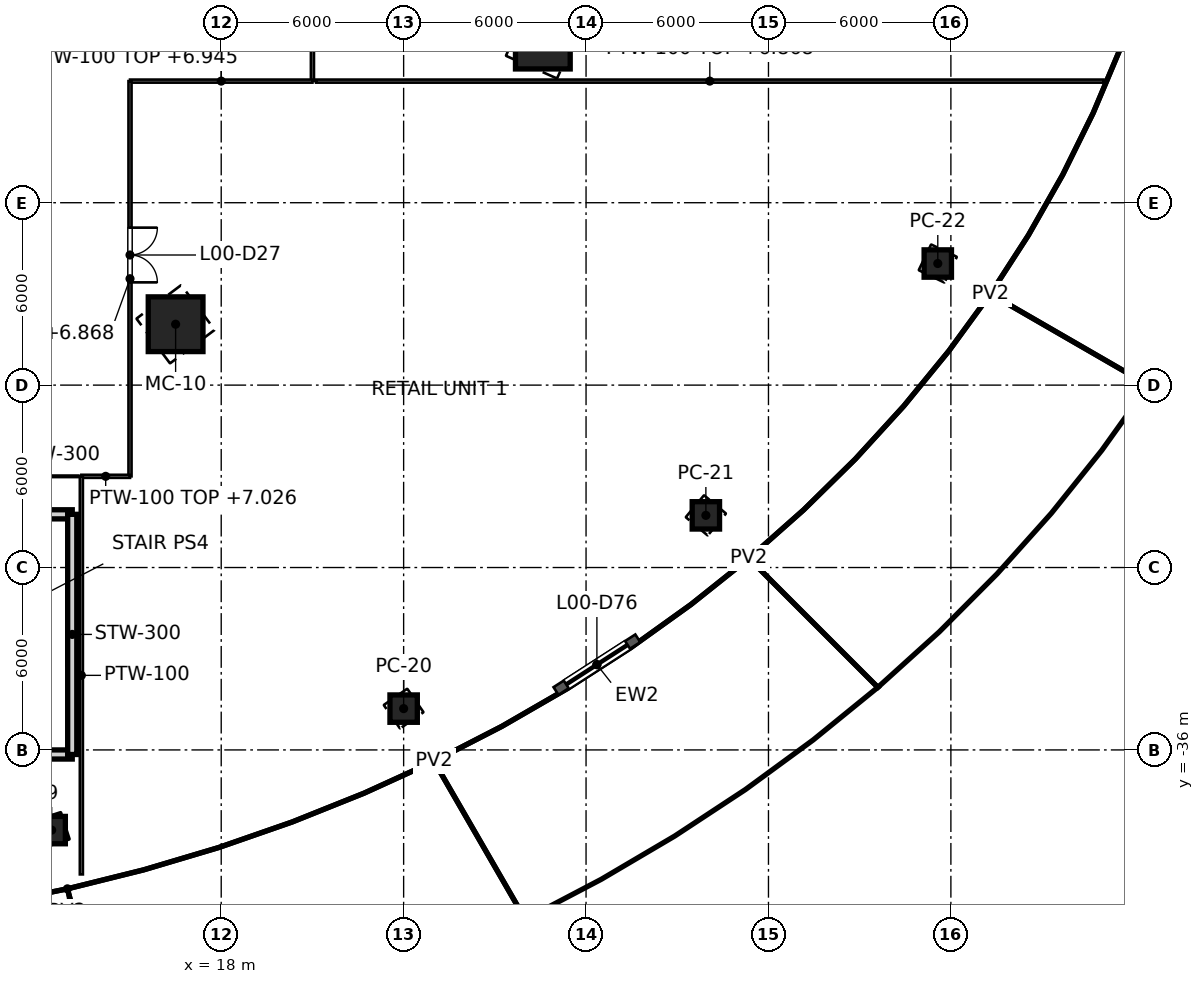
"""IFC4 building model, lengths in metres.
Left out: names, types, materials, properties, quantities, classifications, styles, units other than length and angle.
Written with IfcOpenShell. Run it as: python <this file> out.ifc"""

import sys

from ifc_helpers import new_model, si_unit, direction, frame, frame_2d, origin, origin_2d, place, context, subcontext, project, spatial, rectangle, hollow_rectangle, extrude, element, fill, save


model = new_model("IFC4")
c1 = context("Model", 3, precision=1e-05, world=origin(), true_north=direction((0.0, 1.0)))
c2 = subcontext(c1, "Body", "Model", "MODEL_VIEW")
j1 = project(units=[si_unit("LENGTHUNIT", "METRE"), si_unit("PLANEANGLEUNIT", "RADIAN")], contexts=[c1])
p1 = place(None, origin())
s1 = spatial("IfcSite", under=j1, at=p1, CompositionType="ELEMENT")
p2 = place(p1, origin())
s2 = spatial("IfcBuilding", under=s1, at=p2, CompositionType="ELEMENT")
p3 = place(p2, origin())
s3 = spatial("IfcBuildingStorey", under=s2, at=p3, CompositionType="ELEMENT", Elevation=0.0)
for number, where, z_axis, x_axis in (
    (1, (16.5, -21.997, 0.0), (0.0, 0.0, 1.0), (0.6, -0.8, 0.0)),
    (2, (28.579, -12.7, 0.0), (0.0, 0.0, 1.0), (0.914, -0.406, 0.0)),
):
    element("IfcColumn", number, at=place(p3, frame(where, z_axis=z_axis, x_axis=x_axis)), inside=s3, PredefinedType="COLUMN", context=c2, shape_type="SweptSolid", body=[
        extrude(hollow_rectangle(XDim=1.8, YDim=1.8, WallThickness=0.08, at=origin_2d()), origin(), (0.0, 0.0, 1.0), 8.0),
    ])
for number, where, z_axis, x_axis in (
    (3, (12.423, -38.637, 0.0), (0.0, 0.0, 1.0), (0.306, -0.952, 0.0)),
    (4, (24.0, -34.641, 0.0), (0.0, 0.0, 1.0), (0.569, -0.822, 0.0)),
    (5, (33.941, -28.284, 0.0), (0.0, 0.0, 1.0), (0.768, -0.64, 0.0)),
    (6, (41.569, -20.0, 0.0), (0.0, 0.0, 1.0), (0.901, -0.434, 0.0)),
):
    element("IfcColumn", number, at=place(p3, frame(where, z_axis=z_axis, x_axis=x_axis)), inside=s3, PredefinedType="COLUMN", context=c2, shape_type="SweptSolid", body=[
        extrude(hollow_rectangle(XDim=0.9, YDim=0.9, WallThickness=0.04, at=origin_2d()), origin(), (0.0, 0.0, 1.0), 8.0),
    ])
p4 = place(p3, frame((29.012, -34.062, 0.0), z_axis=(0.0, 0.0, 1.0), x_axis=(0.840530889262, 0.541763623913, 0.0)))
e7 = element("IfcWall", 7, at=p4, inside=s3, PredefinedType="SOLIDWALL", context=c2, shape_type="SweptSolid", body=[
    extrude(rectangle(XDim=3.2, YDim=0.3, at=frame_2d((1.6, 0.0))), origin(), (0.0, 0.0, 1.0), 7.8),
])
p5 = place(p4, frame((0.4, 0.0, 0.0)))
e8 = element("IfcOpeningElement", 8, at=p5, cuts=e7, PredefinedType="OPENING", context=c2, shape_type="SweptSolid", body=[
    extrude(rectangle(XDim=2.4, YDim=2.4, at=frame_2d((1.2, 1.2))), frame((0.0, 0.15, 0.0), z_axis=(0.0, -1.0, 0.0), x_axis=(1.0, 0.0, 0.0)), (0.0, 0.0, 1.0), 0.3),
])
p6 = place(p3, frame((13.1, -36.15, 0.0), z_axis=(0.0, 0.0, 1.0), x_axis=(-1.0, 0.0, 0.0)))
e9 = element("IfcWall", 9, at=p6, inside=s3, PredefinedType="SOLIDWALL", context=c2, shape_type="SweptSolid", body=[
    extrude(rectangle(XDim=4.9, YDim=0.3, at=frame_2d((2.45, 0.0))), origin(), (0.0, 0.0, 1.0), 7.8),
])
p7 = place(p3, frame((8.2, -28.25, 0.0), z_axis=(0.0, 0.0, 1.0), x_axis=(1.0, 0.0, 0.0)))
e10 = element("IfcWall", 10, at=p7, inside=s3, PredefinedType="SOLIDWALL", context=c2, shape_type="SweptSolid", body=[
    extrude(rectangle(XDim=4.9, YDim=0.3, at=frame_2d((2.45, 0.0))), origin(), (0.0, 0.0, 1.0), 7.8),
])
p8 = place(p7, frame((1.85, 0.0, 0.0)))
e11 = element("IfcOpeningElement", 11, at=p8, cuts=e10, PredefinedType="OPENING", context=c2, shape_type="SweptSolid", body=[
    extrude(rectangle(XDim=1.2, YDim=2.1, at=frame_2d((0.6, 1.05))), frame((0.0, 0.15, 0.0), z_axis=(0.0, -1.0, 0.0), x_axis=(1.0, 0.0, 0.0)), (0.0, 0.0, 1.0), 0.3),
])
p9 = place(p3, frame((13.1, -28.25, 0.0), z_axis=(0.0, 0.0, 1.0), x_axis=(0.0, -1.0, 0.0)))
e12 = element("IfcWall", 12, at=p9, inside=s3, PredefinedType="SOLIDWALL", context=c2, shape_type="SweptSolid", body=[
    extrude(rectangle(XDim=7.9, YDim=0.3, at=frame_2d((3.95, 0.0))), origin(), (0.0, 0.0, 1.0), 7.8),
])
p10 = place(p3, frame((21.0, 14.0, 0.0), z_axis=(0.0, 0.0, 1.0), x_axis=(0.0, -1.0, 0.0)))
e13 = element("IfcWall", 13, at=p10, inside=s3, PredefinedType="PARTITIONING", context=c2, shape_type="SweptSolid", body=[
    extrude(rectangle(XDim=28.0, YDim=0.1, at=frame_2d((14.0, 0.0))), origin(), (0.0, 0.0, 1.0), 6.877),
])
p11 = place(p10, frame((23.1, 0.0, 0.0)))
e14 = element("IfcOpeningElement", 14, at=p11, cuts=e13, PredefinedType="OPENING", context=c2, shape_type="SweptSolid", body=[
    extrude(rectangle(XDim=1.8, YDim=2.1, at=frame_2d((0.9, 1.05))), frame((0.0, 0.05, 0.0), z_axis=(0.0, -1.0, 0.0), x_axis=(1.0, 0.0, 0.0)), (0.0, 0.0, 1.0), 0.1),
])
p12 = place(p10, frame((16.55, 0.0, 0.0)))
e15 = element("IfcOpeningElement", 15, at=p12, cuts=e13, PredefinedType="OPENING", context=c2, shape_type="SweptSolid", body=[
    extrude(rectangle(XDim=0.9, YDim=2.1, at=frame_2d((0.45, 1.05))), frame((0.0, 0.05, 0.0), z_axis=(0.0, -1.0, 0.0), x_axis=(1.0, 0.0, 0.0)), (0.0, 0.0, 1.0), 0.1),
])
p13 = place(p10, frame((11.95, 0.0, 0.0)))
e16 = element("IfcOpeningElement", 16, at=p13, cuts=e13, PredefinedType="OPENING", context=c2, shape_type="SweptSolid", body=[
    extrude(rectangle(XDim=0.9, YDim=2.1, at=frame_2d((0.45, 1.05))), frame((0.0, 0.05, 0.0), z_axis=(0.0, -1.0, 0.0), x_axis=(1.0, 0.0, 0.0)), (0.0, 0.0, 1.0), 0.1),
])
p14 = place(p10, frame((7.35, 0.0, 0.0)))
e17 = element("IfcOpeningElement", 17, at=p14, cuts=e13, PredefinedType="OPENING", context=c2, shape_type="SweptSolid", body=[
    extrude(rectangle(XDim=0.9, YDim=2.1, at=frame_2d((0.45, 1.05))), frame((0.0, 0.05, 0.0), z_axis=(0.0, -1.0, 0.0), x_axis=(1.0, 0.0, 0.0)), (0.0, 0.0, 1.0), 0.1),
])
p15 = place(p3, frame((21.0, -14.0, 0.0), z_axis=(0.0, 0.0, 1.0), x_axis=(-1.0, 0.0, 0.0)))
e18 = element("IfcWall", 18, at=p15, inside=s3, PredefinedType="PARTITIONING", context=c2, shape_type="SweptSolid", body=[
    extrude(rectangle(XDim=6.0, YDim=0.1, at=frame_2d((3.0, 0.0))), origin(), (0.0, 0.0, 1.0), 6.945),
])
p16 = place(p3, frame((15.0, -14.0, 0.0), z_axis=(0.0, 0.0, 1.0), x_axis=(0.0, -1.0, 0.0)))
e19 = element("IfcWall", 19, at=p16, inside=s3, PredefinedType="PARTITIONING", context=c2, shape_type="SweptSolid", body=[
    extrude(rectangle(XDim=13.0, YDim=0.1, at=frame_2d((6.5, 0.0))), origin(), (0.0, 0.0, 1.0), 6.868),
])
p17 = place(p16, frame((4.82, 0.0, 0.0)))
e20 = element("IfcOpeningElement", 20, at=p17, cuts=e19, PredefinedType="OPENING", context=c2, shape_type="SweptSolid", body=[
    extrude(rectangle(XDim=1.8, YDim=2.1, at=frame_2d((0.9, 1.05))), frame((0.0, 0.05, 0.0), z_axis=(0.0, -1.0, 0.0), x_axis=(1.0, 0.0, 0.0)), (0.0, 0.0, 1.0), 0.1),
])
p18 = place(p3, frame((15.0, -27.0, 0.0), z_axis=(0.0, 0.0, 1.0), x_axis=(-1.0, 0.0, 0.0)))
e21 = element("IfcWall", 21, at=p18, inside=s3, PredefinedType="PARTITIONING", context=c2, shape_type="SweptSolid", body=[
    extrude(rectangle(XDim=1.6, YDim=0.1, at=frame_2d((0.8, 0.0))), origin(), (0.0, 0.0, 1.0), 7.026),
])
p19 = place(p3, frame((13.4, -27.0, 0.0), z_axis=(0.0, 0.0, 1.0), x_axis=(0.0, -1.0, 0.0)))
e22 = element("IfcWall", 22, at=p19, inside=s3, PredefinedType="PARTITIONING", context=c2, shape_type="SweptSolid", body=[
    extrude(rectangle(XDim=13.094, YDim=0.1, at=frame_2d((6.547, 0.0))), origin(), (0.0, 0.0, 1.0), 6.877),
])
p20 = place(p3, frame((-13.304, -27.0, 0.0), z_axis=(0.0, 0.0, 1.0), x_axis=(1.0, 0.0, 0.0)))
e23 = element("IfcWall", 23, at=p20, inside=s3, PredefinedType="PARTITIONING", context=c2, shape_type="SweptSolid", body=[
    extrude(rectangle(XDim=26.608, YDim=0.05, at=frame_2d((13.304, 0.0))), origin(), (0.0, 0.0, 1.0), 7.026),
])
p21 = place(p20, frame((3.796, 0.0, 0.0)))
e24 = element("IfcOpeningElement", 24, at=p21, cuts=e23, PredefinedType="OPENING", context=c2, shape_type="SweptSolid", body=[
    extrude(rectangle(XDim=2.7, YDim=2.4, at=frame_2d((1.35, 1.2))), frame((0.0, 0.025, 0.0), z_axis=(0.0, -1.0, 0.0), x_axis=(1.0, 0.0, 0.0)), (0.0, 0.0, 1.0), 0.05),
])
p22 = place(p20, frame((14.868, 0.0, 0.0)))
e25 = element("IfcOpeningElement", 25, at=p22, cuts=e23, PredefinedType="OPENING", context=c2, shape_type="SweptSolid", body=[
    extrude(rectangle(XDim=2.7, YDim=2.4, at=frame_2d((1.35, 1.2))), frame((0.0, 0.025, 0.0), z_axis=(0.0, -1.0, 0.0), x_axis=(1.0, 0.0, 0.0)), (0.0, 0.0, 1.0), 0.05),
])
p23 = place(p20, frame((20.112, 0.0, 0.0)))
e26 = element("IfcOpeningElement", 26, at=p23, cuts=e23, PredefinedType="OPENING", context=c2, shape_type="SweptSolid", body=[
    extrude(rectangle(XDim=2.7, YDim=2.4, at=frame_2d((1.35, 1.2))), frame((0.0, 0.025, 0.0), z_axis=(0.0, -1.0, 0.0), x_axis=(1.0, 0.0, 0.0)), (0.0, 0.0, 1.0), 0.05),
])
p24 = place(p3, frame((21.121, -14.0, 0.0), z_axis=(0.0, 0.0, 1.0), x_axis=(1.0, 0.0, 0.0)))
e27 = element("IfcWall", 27, at=p24, inside=s3, PredefinedType="PARTITIONING", context=c2, shape_type="SweptSolid", body=[
    extrude(rectangle(XDim=25.9, YDim=0.1, at=frame_2d((12.95, 0.0))), origin(), (0.0, 0.0, 1.0), 6.868),
])
p25 = place(p5, origin())
e28 = element("IfcDoor", 28, at=p25, inside=s3, OperationType="DOUBLE_DOOR_SLIDING", PredefinedType="DOOR", context=c2, shape_type="SweptSolid", body=[
    extrude(rectangle(XDim=2.4, YDim=2.4, at=frame_2d((1.2, 1.2))), frame((0.0, 0.025, 0.0), z_axis=(0.0, -1.0, 0.0), x_axis=(1.0, 0.0, 0.0)), (0.0, 0.0, 1.0), 0.05),
])
fill(e8, e28)
p26 = place(p17, origin())
e29 = element("IfcDoor", 29, at=p26, inside=s3, OperationType="DOUBLE_DOOR_SINGLE_SWING", PredefinedType="DOOR", context=c2, shape_type="SweptSolid", body=[
    extrude(rectangle(XDim=1.8, YDim=2.1, at=frame_2d((0.9, 1.05))), frame((0.0, 0.025, 0.0), z_axis=(0.0, -1.0, 0.0), x_axis=(1.0, 0.0, 0.0)), (0.0, 0.0, 1.0), 0.05),
])
fill(e20, e29)
save(model, sys.argv[1])
